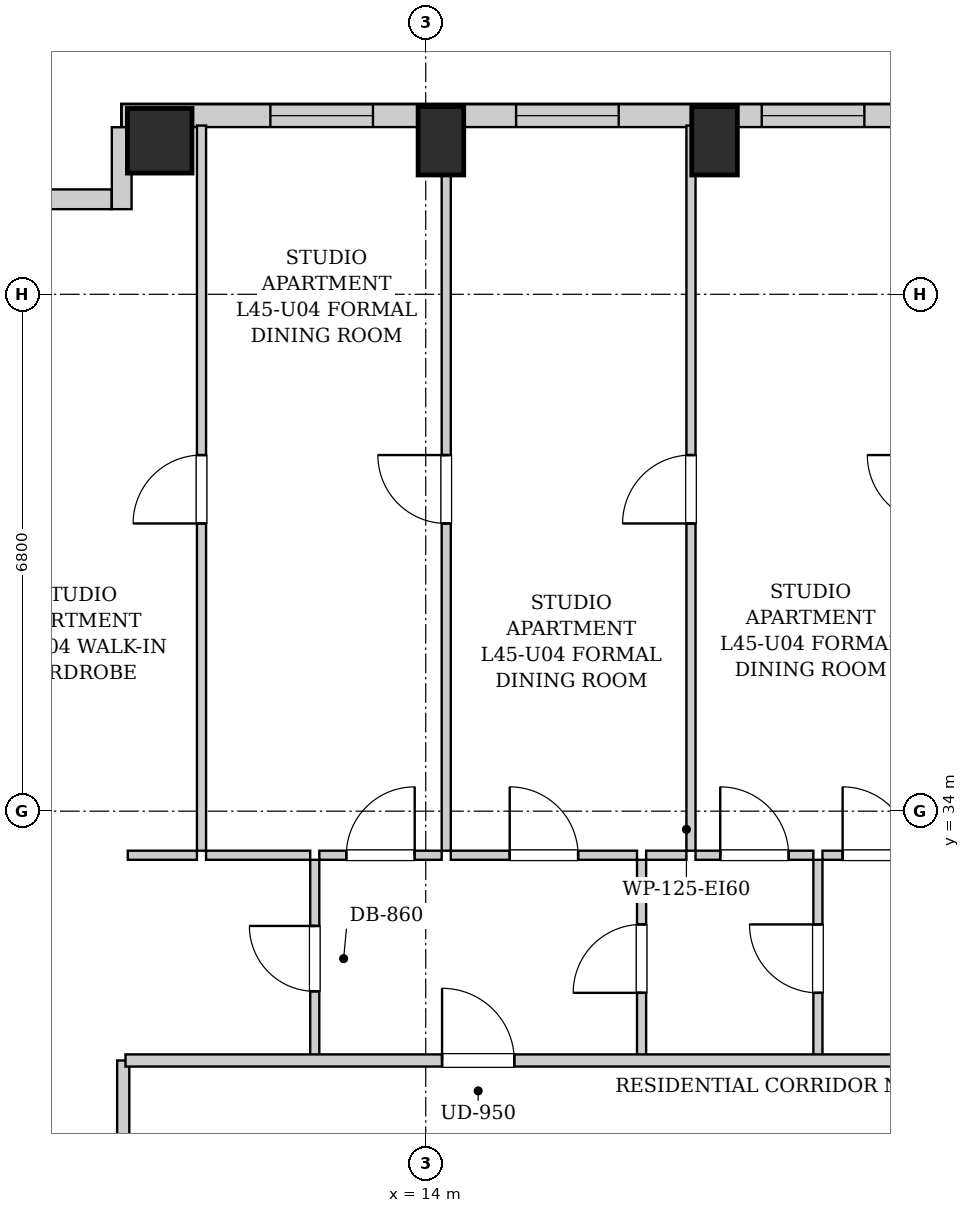
"""IFC4 building model, lengths in metres.
Left out: names, types, materials, properties, quantities, classifications, styles, units other than length and angle.
Written with IfcOpenShell. Run it as: python <this file> out.ifc"""

import sys

from ifc_helpers import new_model, si_unit, direction, frame, frame_2d, origin, origin_2d, place, context, subcontext, project, spatial, rectangle, extrude, element, fill, save


model = new_model("IFC4")
c1 = context("Model", 3, precision=1e-05, world=origin(), true_north=direction((0.0, 1.0)))
c2 = subcontext(c1, "Body", "Model", "MODEL_VIEW")
j1 = project(units=[si_unit("LENGTHUNIT", "METRE"), si_unit("PLANEANGLEUNIT", "RADIAN")], contexts=[c1])
p1 = place(None, origin())
s1 = spatial("IfcSite", under=j1, at=p1, CompositionType="ELEMENT")
p2 = place(p1, origin())
s2 = spatial("IfcBuilding", under=s1, at=p2, CompositionType="ELEMENT")
p3 = place(p2, frame((0.0, 0.0, 156.9)))
s3 = spatial("IfcBuildingStorey", under=s2, at=p3, CompositionType="ELEMENT", Elevation=156.9)
p4 = place(p3, frame((10.5, 42.82, 0.0), z_axis=(0.0, 0.0, 1.0), x_axis=(1.0, 0.0, 0.0)))
e1 = element("IfcColumn", 1, at=p4, inside=s3, PredefinedType="COLUMN", context=c2, shape_type="SweptSolid", body=[
    extrude(rectangle(XDim=0.85, YDim=0.85, at=origin_2d()), origin(), (0.0, 0.0, 1.0), 3.25),
])
for number, where, z_axis, x_axis in (
    (2, (14.2, 42.82, 0.0), (0.0, 0.0, 1.0), (1.0, 0.0, 0.0)),
    (3, (17.8, 42.82, 0.0), (0.0, 0.0, 1.0), (1.0, 0.0, 0.0)),
):
    element("IfcColumn", number, at=place(p3, frame(where, z_axis=z_axis, x_axis=x_axis)), inside=s3, PredefinedType="COLUMN", context=c2, shape_type="SweptSolid", body=[
        extrude(rectangle(XDim=0.6, YDim=0.9, at=origin_2d()), origin(), (0.0, 0.0, 1.0), 3.25),
    ])
p5 = place(p3, frame((10.0, 43.15, 0.0), z_axis=(0.0, 0.0, 1.0), x_axis=(1.0, 0.0, 0.0)))
e4 = element("IfcWall", 4, at=p5, inside=s3, PredefinedType="SOLIDWALL", context=c2, shape_type="SweptSolid", body=[
    extrude(rectangle(XDim=21.35, YDim=0.3, at=frame_2d((10.675, 0.0))), origin(), (0.0, 0.0, 1.0), 2.99),
])
p6 = place(p5, frame((1.956, 0.0, 0.55)))
e5 = element("IfcOpeningElement", 5, at=p6, cuts=e4, PredefinedType="OPENING", context=c2, shape_type="SweptSolid", body=[
    extrude(rectangle(XDim=1.35, YDim=1.2, at=frame_2d((0.675, 0.6))), frame((0.0, 0.16, 0.0), z_axis=(0.0, -1.0, 0.0), x_axis=(1.0, 0.0, 0.0)), (0.0, 0.0, 1.0), 0.32),
])
p7 = place(p5, frame((5.189, 0.0, 0.55)))
e6 = element("IfcOpeningElement", 6, at=p7, cuts=e4, PredefinedType="OPENING", context=c2, shape_type="SweptSolid", body=[
    extrude(rectangle(XDim=1.35, YDim=1.2, at=frame_2d((0.675, 0.6))), frame((0.0, 0.16, 0.0), z_axis=(0.0, -1.0, 0.0), x_axis=(1.0, 0.0, 0.0)), (0.0, 0.0, 1.0), 0.32),
])
p8 = place(p5, frame((8.421, 0.0, 0.55)))
e7 = element("IfcOpeningElement", 7, at=p8, cuts=e4, PredefinedType="OPENING", context=c2, shape_type="SweptSolid", body=[
    extrude(rectangle(XDim=1.35, YDim=1.2, at=frame_2d((0.675, 0.6))), frame((0.0, 0.16, 0.0), z_axis=(0.0, -1.0, 0.0), x_axis=(1.0, 0.0, 0.0)), (0.0, 0.0, 1.0), 0.32),
])
p9 = place(p5, frame((11.15, 0.0, 0.55)))
e8 = element("IfcOpeningElement", 8, at=p9, cuts=e4, PredefinedType="OPENING", context=c2, shape_type="SweptSolid", body=[
    extrude(rectangle(XDim=1.35, YDim=1.2, at=frame_2d((0.675, 0.6))), frame((0.0, 0.16, 0.0), z_axis=(0.0, -1.0, 0.0), x_axis=(1.0, 0.0, 0.0)), (0.0, 0.0, 1.0), 0.32),
])
p10 = place(p5, frame((18.044, 0.0, 0.55)))
e9 = element("IfcOpeningElement", 9, at=p10, cuts=e4, PredefinedType="OPENING", context=c2, shape_type="SweptSolid", body=[
    extrude(rectangle(XDim=1.35, YDim=1.2, at=frame_2d((0.675, 0.6))), frame((0.0, 0.16, 0.0), z_axis=(0.0, -1.0, 0.0), x_axis=(1.0, 0.0, 0.0)), (0.0, 0.0, 1.0), 0.32),
])
p11 = place(p3, frame((8.882, 42.05, 0.0), z_axis=(0.0, 0.0, 1.0), x_axis=(1.0, 0.0, 0.0)))
e10 = element("IfcWall", 10, at=p11, inside=s3, PredefinedType="SOLIDWALL", context=c2, shape_type="SweptSolid", body=[
    extrude(rectangle(XDim=0.986, YDim=0.26, at=frame_2d((0.493, 0.0))), origin(), (0.0, 0.0, 1.0), 2.99),
])
p12 = place(p3, frame((10.0, 41.92, 0.0), z_axis=(0.0, 0.0, 1.0), x_axis=(0.0, 1.0, 0.0)))
e11 = element("IfcWall", 11, at=p12, inside=s3, PredefinedType="SOLIDWALL", context=c2, shape_type="SweptSolid", body=[
    extrude(rectangle(XDim=1.078, YDim=0.26, at=frame_2d((0.539, 0.0))), origin(), (0.0, 0.0, 1.0), 2.99),
])
p13 = place(p3, frame((10.02, 28.98, 0.0), z_axis=(0.0, 0.0, 1.0), x_axis=(0.0, 1.0, 0.0)))
e12 = element("IfcWall", 12, at=p13, inside=s3, PredefinedType="PARTITIONING", context=c2, shape_type="SweptSolid", body=[
    extrude(rectangle(XDim=1.74, YDim=0.16, at=frame_2d((0.87, 0.0))), origin(), (0.0, 0.0, 1.0), 2.99),
])
p14 = place(p3, frame((12.54, 30.76, 0.0), z_axis=(0.0, 0.0, 1.0), x_axis=(0.0, 1.0, 0.0)))
e13 = element("IfcWall", 13, at=p14, inside=s3, PredefinedType="PARTITIONING", context=c2, shape_type="SweptSolid", body=[
    extrude(rectangle(XDim=2.6, YDim=0.12, at=frame_2d((1.3, 0.0))), origin(), (0.0, 0.0, 1.0), 2.99),
])
p15 = place(p14, frame((0.87, 0.0, 0.0)))
e14 = element("IfcOpeningElement", 14, at=p15, cuts=e13, PredefinedType="OPENING", context=c2, shape_type="SweptSolid", body=[
    extrude(rectangle(XDim=0.86, YDim=2.05, at=frame_2d((0.43, 1.025))), frame((0.0, 0.07, 0.0), z_axis=(0.0, -1.0, 0.0), x_axis=(1.0, 0.0, 0.0)), (0.0, 0.0, 1.0), 0.14),
])
p16 = place(p3, frame((10.08, 33.42, 0.0), z_axis=(0.0, 0.0, 1.0), x_axis=(1.0, 0.0, 0.0)))
e15 = element("IfcWall", 15, at=p16, inside=s3, PredefinedType="PARTITIONING", context=c2, shape_type="SweptSolid", body=[
    extrude(rectangle(XDim=0.91, YDim=0.12, at=frame_2d((0.455, 0.0))), origin(), (0.0, 0.0, 1.0), 2.99),
])
p17 = place(p3, frame((11.11, 33.42, 0.0), z_axis=(0.0, 0.0, 1.0), x_axis=(1.0, 0.0, 0.0)))
e16 = element("IfcWall", 16, at=p17, inside=s3, PredefinedType="PARTITIONING", context=c2, shape_type="SweptSolid", body=[
    extrude(rectangle(XDim=1.37, YDim=0.12, at=frame_2d((0.685, 0.0))), origin(), (0.0, 0.0, 1.0), 2.99),
])
p18 = place(p3, frame((16.84, 30.76, 0.0), z_axis=(0.0, 0.0, 1.0), x_axis=(0.0, 1.0, 0.0)))
e17 = element("IfcWall", 17, at=p18, inside=s3, PredefinedType="PARTITIONING", context=c2, shape_type="SweptSolid", body=[
    extrude(rectangle(XDim=2.6, YDim=0.12, at=frame_2d((1.3, 0.0))), origin(), (0.0, 0.0, 1.0), 2.99),
])
p19 = place(p18, frame((0.85, 0.0, 0.0)))
e18 = element("IfcOpeningElement", 18, at=p19, cuts=e17, PredefinedType="OPENING", context=c2, shape_type="SweptSolid", body=[
    extrude(rectangle(XDim=0.9, YDim=2.05, at=frame_2d((0.45, 1.025))), frame((0.0, 0.07, 0.0), z_axis=(0.0, -1.0, 0.0), x_axis=(1.0, 0.0, 0.0)), (0.0, 0.0, 1.0), 0.14),
])
p20 = place(p3, frame((12.6, 33.42, 0.0), z_axis=(0.0, 0.0, 1.0), x_axis=(1.0, 0.0, 0.0)))
e19 = element("IfcWall", 19, at=p20, inside=s3, PredefinedType="PARTITIONING", context=c2, shape_type="SweptSolid", body=[
    extrude(rectangle(XDim=1.61, YDim=0.12, at=frame_2d((0.805, 0.0))), origin(), (0.0, 0.0, 1.0), 2.99),
])
p21 = place(p20, frame((0.355, 0.0, 0.0)))
e20 = element("IfcOpeningElement", 20, at=p21, cuts=e19, PredefinedType="OPENING", context=c2, shape_type="SweptSolid", body=[
    extrude(rectangle(XDim=0.9, YDim=2.05, at=frame_2d((0.45, 1.025))), frame((0.0, 0.07, 0.0), z_axis=(0.0, -1.0, 0.0), x_axis=(1.0, 0.0, 0.0)), (0.0, 0.0, 1.0), 0.14),
])
p22 = place(p3, frame((14.33, 33.42, 0.0), z_axis=(0.0, 0.0, 1.0), x_axis=(1.0, 0.0, 0.0)))
e21 = element("IfcWall", 21, at=p22, inside=s3, PredefinedType="PARTITIONING", context=c2, shape_type="SweptSolid", body=[
    extrude(rectangle(XDim=2.45, YDim=0.12, at=frame_2d((1.225, 0.0))), origin(), (0.0, 0.0, 1.0), 2.99),
])
p23 = place(p22, frame((0.775, 0.0, 0.0)))
e22 = element("IfcOpeningElement", 22, at=p23, cuts=e21, PredefinedType="OPENING", context=c2, shape_type="SweptSolid", body=[
    extrude(rectangle(XDim=0.9, YDim=2.05, at=frame_2d((0.45, 1.025))), frame((0.0, 0.07, 0.0), z_axis=(0.0, -1.0, 0.0), x_axis=(1.0, 0.0, 0.0)), (0.0, 0.0, 1.0), 0.14),
])
p24 = place(p3, frame((19.16, 30.76, 0.0), z_axis=(0.0, 0.0, 1.0), x_axis=(0.0, 1.0, 0.0)))
e23 = element("IfcWall", 23, at=p24, inside=s3, PredefinedType="PARTITIONING", context=c2, shape_type="SweptSolid", body=[
    extrude(rectangle(XDim=2.6, YDim=0.12, at=frame_2d((1.3, 0.0))), origin(), (0.0, 0.0, 1.0), 2.99),
])
p25 = place(p24, frame((0.85, 0.0, 0.0)))
e24 = element("IfcOpeningElement", 24, at=p25, cuts=e23, PredefinedType="OPENING", context=c2, shape_type="SweptSolid", body=[
    extrude(rectangle(XDim=0.9, YDim=2.05, at=frame_2d((0.45, 1.025))), frame((0.0, 0.07, 0.0), z_axis=(0.0, -1.0, 0.0), x_axis=(1.0, 0.0, 0.0)), (0.0, 0.0, 1.0), 0.14),
])
p26 = place(p3, frame((16.9, 33.42, 0.0), z_axis=(0.0, 0.0, 1.0), x_axis=(1.0, 0.0, 0.0)))
e25 = element("IfcWall", 25, at=p26, inside=s3, PredefinedType="PARTITIONING", context=c2, shape_type="SweptSolid", body=[
    extrude(rectangle(XDim=0.53, YDim=0.12, at=frame_2d((0.265, 0.0))), origin(), (0.0, 0.0, 1.0), 2.99),
])
p27 = place(p3, frame((17.55, 33.42, 0.0), z_axis=(0.0, 0.0, 1.0), x_axis=(1.0, 0.0, 0.0)))
e26 = element("IfcWall", 26, at=p27, inside=s3, PredefinedType="PARTITIONING", context=c2, shape_type="SweptSolid", body=[
    extrude(rectangle(XDim=1.55, YDim=0.12, at=frame_2d((0.775, 0.0))), origin(), (0.0, 0.0, 1.0), 2.99),
])
p28 = place(p27, frame((0.325, 0.0, 0.0)))
e27 = element("IfcOpeningElement", 27, at=p28, cuts=e26, PredefinedType="OPENING", context=c2, shape_type="SweptSolid", body=[
    extrude(rectangle(XDim=0.9, YDim=2.05, at=frame_2d((0.45, 1.025))), frame((0.0, 0.07, 0.0), z_axis=(0.0, -1.0, 0.0), x_axis=(1.0, 0.0, 0.0)), (0.0, 0.0, 1.0), 0.14),
])
p29 = place(p3, frame((19.22, 33.42, 0.0), z_axis=(0.0, 0.0, 1.0), x_axis=(1.0, 0.0, 0.0)))
e28 = element("IfcWall", 28, at=p29, inside=s3, PredefinedType="PARTITIONING", context=c2, shape_type="SweptSolid", body=[
    extrude(rectangle(XDim=1.43, YDim=0.12, at=frame_2d((0.715, 0.0))), origin(), (0.0, 0.0, 1.0), 2.99),
])
p30 = place(p29, frame((0.265, 0.0, 0.0)))
e29 = element("IfcOpeningElement", 29, at=p30, cuts=e28, PredefinedType="OPENING", context=c2, shape_type="SweptSolid", body=[
    extrude(rectangle(XDim=0.9, YDim=2.05, at=frame_2d((0.45, 1.025))), frame((0.0, 0.07, 0.0), z_axis=(0.0, -1.0, 0.0), x_axis=(1.0, 0.0, 0.0)), (0.0, 0.0, 1.0), 0.14),
])
p31 = place(p3, frame((11.05, 33.48, 0.0), z_axis=(0.0, 0.0, 1.0), x_axis=(0.0, 1.0, 0.0)))
e30 = element("IfcWall", 30, at=p31, inside=s3, PredefinedType="PARTITIONING", context=c2, shape_type="SweptSolid", body=[
    extrude(rectangle(XDim=9.54, YDim=0.12, at=frame_2d((4.77, 0.0))), origin(), (0.0, 0.0, 1.0), 2.99),
])
p32 = place(p31, frame((4.305, 0.0, 0.0)))
e31 = element("IfcOpeningElement", 31, at=p32, cuts=e30, PredefinedType="OPENING", context=c2, shape_type="SweptSolid", body=[
    extrude(rectangle(XDim=0.9, YDim=2.05, at=frame_2d((0.45, 1.025))), frame((0.0, 0.07, 0.0), z_axis=(0.0, -1.0, 0.0), x_axis=(1.0, 0.0, 0.0)), (0.0, 0.0, 1.0), 0.14),
])
p33 = place(p3, frame((14.27, 33.48, 0.0), z_axis=(0.0, 0.0, 1.0), x_axis=(0.0, 1.0, 0.0)))
e32 = element("IfcWall", 32, at=p33, inside=s3, PredefinedType="PARTITIONING", context=c2, shape_type="SweptSolid", body=[
    extrude(rectangle(XDim=9.54, YDim=0.12, at=frame_2d((4.77, 0.0))), origin(), (0.0, 0.0, 1.0), 2.99),
])
p34 = place(p33, frame((4.305, 0.0, 0.0)))
e33 = element("IfcOpeningElement", 33, at=p34, cuts=e32, PredefinedType="OPENING", context=c2, shape_type="SweptSolid", body=[
    extrude(rectangle(XDim=0.9, YDim=2.05, at=frame_2d((0.45, 1.025))), frame((0.0, 0.07, 0.0), z_axis=(0.0, -1.0, 0.0), x_axis=(1.0, 0.0, 0.0)), (0.0, 0.0, 1.0), 0.14),
])
p35 = place(p3, frame((17.49, 33.48, 0.0), z_axis=(0.0, 0.0, 1.0), x_axis=(0.0, 1.0, 0.0)))
e34 = element("IfcWall", 34, at=p35, inside=s3, PredefinedType="PARTITIONING", context=c2, shape_type="SweptSolid", body=[
    extrude(rectangle(XDim=9.54, YDim=0.12, at=frame_2d((4.77, 0.0))), origin(), (0.0, 0.0, 1.0), 2.99),
])
p36 = place(p35, frame((4.305, 0.0, 0.0)))
e35 = element("IfcOpeningElement", 35, at=p36, cuts=e34, PredefinedType="OPENING", context=c2, shape_type="SweptSolid", body=[
    extrude(rectangle(XDim=0.9, YDim=2.05, at=frame_2d((0.45, 1.025))), frame((0.0, 0.07, 0.0), z_axis=(0.0, -1.0, 0.0), x_axis=(1.0, 0.0, 0.0)), (0.0, 0.0, 1.0), 0.14),
])
p37 = place(p3, frame((10.05, 30.72, 0.0), z_axis=(0.0, 0.0, 1.0), x_axis=(1.0, 0.0, 0.0)))
e36 = element("IfcWall", 36, at=p37, inside=s3, PredefinedType="PARTITIONING", context=c2, shape_type="SweptSolid", body=[
    extrude(rectangle(XDim=27.7, YDim=0.16, at=frame_2d((13.85, 0.0))), origin(), (0.0, 0.0, 1.0), 2.99),
])
p38 = place(p37, frame((4.165, 0.0, 0.0)))
e37 = element("IfcOpeningElement", 37, at=p38, cuts=e36, PredefinedType="OPENING", context=c2, shape_type="SweptSolid", body=[
    extrude(rectangle(XDim=0.95, YDim=2.1, at=frame_2d((0.475, 1.05))), frame((0.0, 0.09, 0.0), z_axis=(0.0, -1.0, 0.0), x_axis=(1.0, 0.0, 0.0)), (0.0, 0.0, 1.0), 0.18),
])
p39 = place(p15, origin())
e38 = element("IfcDoor", 38, at=p39, inside=s3, OperationType="SINGLE_SWING_RIGHT", PredefinedType="DOOR", context=c2, shape_type="SweptSolid", body=[
    extrude(rectangle(XDim=0.86, YDim=2.05, at=frame_2d((0.43, 1.025))), frame((0.0, 0.025, 0.0), z_axis=(0.0, -1.0, 0.0), x_axis=(1.0, 0.0, 0.0)), (0.0, 0.0, 1.0), 0.05),
])
fill(e14, e38)
p40 = place(p19, origin())
e39 = element("IfcDoor", 39, at=p40, inside=s3, OperationType="SINGLE_SWING_LEFT", PredefinedType="DOOR", context=c2, shape_type="SweptSolid", body=[
    extrude(rectangle(XDim=0.9, YDim=2.05, at=frame_2d((0.45, 1.025))), frame((0.0, 0.025, 0.0), z_axis=(0.0, -1.0, 0.0), x_axis=(1.0, 0.0, 0.0)), (0.0, 0.0, 1.0), 0.05),
])
fill(e18, e39)
p41 = place(p21, origin())
e40 = element("IfcDoor", 40, at=p41, inside=s3, OperationType="SINGLE_SWING_RIGHT", PredefinedType="DOOR", context=c2, shape_type="SweptSolid", body=[
    extrude(rectangle(XDim=0.9, YDim=2.05, at=frame_2d((0.45, 1.025))), frame((0.0, 0.025, 0.0), z_axis=(0.0, -1.0, 0.0), x_axis=(1.0, 0.0, 0.0)), (0.0, 0.0, 1.0), 0.05),
])
fill(e20, e40)
p42 = place(p23, origin())
e41 = element("IfcDoor", 41, at=p42, inside=s3, OperationType="SINGLE_SWING_LEFT", PredefinedType="DOOR", context=c2, shape_type="SweptSolid", body=[
    extrude(rectangle(XDim=0.9, YDim=2.05, at=frame_2d((0.45, 1.025))), frame((0.0, 0.025, 0.0), z_axis=(0.0, -1.0, 0.0), x_axis=(1.0, 0.0, 0.0)), (0.0, 0.0, 1.0), 0.05),
])
fill(e22, e41)
p43 = place(p25, origin())
e42 = element("IfcDoor", 42, at=p43, inside=s3, OperationType="SINGLE_SWING_RIGHT", PredefinedType="DOOR", context=c2, shape_type="SweptSolid", body=[
    extrude(rectangle(XDim=0.9, YDim=2.05, at=frame_2d((0.45, 1.025))), frame((0.0, 0.025, 0.0), z_axis=(0.0, -1.0, 0.0), x_axis=(1.0, 0.0, 0.0)), (0.0, 0.0, 1.0), 0.05),
])
fill(e24, e42)
p44 = place(p28, origin())
e43 = element("IfcDoor", 43, at=p44, inside=s3, OperationType="SINGLE_SWING_LEFT", PredefinedType="DOOR", context=c2, shape_type="SweptSolid", body=[
    extrude(rectangle(XDim=0.9, YDim=2.05, at=frame_2d((0.45, 1.025))), frame((0.0, 0.025, 0.0), z_axis=(0.0, -1.0, 0.0), x_axis=(1.0, 0.0, 0.0)), (0.0, 0.0, 1.0), 0.05),
])
fill(e27, e43)
p45 = place(p30, origin())
e44 = element("IfcDoor", 44, at=p45, inside=s3, OperationType="SINGLE_SWING_LEFT", PredefinedType="DOOR", context=c2, shape_type="SweptSolid", body=[
    extrude(rectangle(XDim=0.9, YDim=2.05, at=frame_2d((0.45, 1.025))), frame((0.0, 0.025, 0.0), z_axis=(0.0, -1.0, 0.0), x_axis=(1.0, 0.0, 0.0)), (0.0, 0.0, 1.0), 0.05),
])
fill(e29, e44)
p46 = place(p32, origin())
e45 = element("IfcDoor", 45, at=p46, inside=s3, OperationType="SINGLE_SWING_LEFT", PredefinedType="DOOR", context=c2, shape_type="SweptSolid", body=[
    extrude(rectangle(XDim=0.9, YDim=2.05, at=frame_2d((0.45, 1.025))), frame((0.0, 0.025, 0.0), z_axis=(0.0, -1.0, 0.0), x_axis=(1.0, 0.0, 0.0)), (0.0, 0.0, 1.0), 0.05),
])
fill(e31, e45)
p47 = place(p34, origin())
e46 = element("IfcDoor", 46, at=p47, inside=s3, OperationType="SINGLE_SWING_RIGHT", PredefinedType="DOOR", context=c2, shape_type="SweptSolid", body=[
    extrude(rectangle(XDim=0.9, YDim=2.05, at=frame_2d((0.45, 1.025))), frame((0.0, 0.025, 0.0), z_axis=(0.0, -1.0, 0.0), x_axis=(1.0, 0.0, 0.0)), (0.0, 0.0, 1.0), 0.05),
])
fill(e33, e46)
p48 = place(p36, origin())
e47 = element("IfcDoor", 47, at=p48, inside=s3, OperationType="SINGLE_SWING_LEFT", PredefinedType="DOOR", context=c2, shape_type="SweptSolid", body=[
    extrude(rectangle(XDim=0.9, YDim=2.05, at=frame_2d((0.45, 1.025))), frame((0.0, 0.025, 0.0), z_axis=(0.0, -1.0, 0.0), x_axis=(1.0, 0.0, 0.0)), (0.0, 0.0, 1.0), 0.05),
])
fill(e35, e47)
p49 = place(p38, origin())
e48 = element("IfcDoor", 48, at=p49, inside=s3, OperationType="SINGLE_SWING_LEFT", PredefinedType="DOOR", context=c2, shape_type="SweptSolid", body=[
    extrude(rectangle(XDim=0.95, YDim=2.1, at=frame_2d((0.475, 1.05))), frame((0.0, 0.025, 0.0), z_axis=(0.0, -1.0, 0.0), x_axis=(1.0, 0.0, 0.0)), (0.0, 0.0, 1.0), 0.05),
])
fill(e37, e48)
p50 = place(p6, origin())
e49 = element("IfcWindow", 49, at=p50, inside=s3, PartitioningType="SINGLE_PANEL", PredefinedType="WINDOW", context=c2, shape_type="SweptSolid", body=[
    extrude(rectangle(XDim=1.35, YDim=1.2, at=frame_2d((0.675, 0.6))), frame((0.0, 0.03, 0.0), z_axis=(0.0, -1.0, 0.0), x_axis=(1.0, 0.0, 0.0)), (0.0, 0.0, 1.0), 0.06),
])
fill(e5, e49)
p51 = place(p7, origin())
e50 = element("IfcWindow", 50, at=p51, inside=s3, PartitioningType="SINGLE_PANEL", PredefinedType="WINDOW", context=c2, shape_type="SweptSolid", body=[
    extrude(rectangle(XDim=1.35, YDim=1.2, at=frame_2d((0.675, 0.6))), frame((0.0, 0.03, 0.0), z_axis=(0.0, -1.0, 0.0), x_axis=(1.0, 0.0, 0.0)), (0.0, 0.0, 1.0), 0.06),
])
fill(e6, e50)
p52 = place(p8, origin())
e51 = element("IfcWindow", 51, at=p52, inside=s3, PartitioningType="SINGLE_PANEL", PredefinedType="WINDOW", context=c2, shape_type="SweptSolid", body=[
    extrude(rectangle(XDim=1.35, YDim=1.2, at=frame_2d((0.675, 0.6))), frame((0.0, 0.03, 0.0), z_axis=(0.0, -1.0, 0.0), x_axis=(1.0, 0.0, 0.0)), (0.0, 0.0, 1.0), 0.06),
])
fill(e7, e51)
save(model, sys.argv[1])
